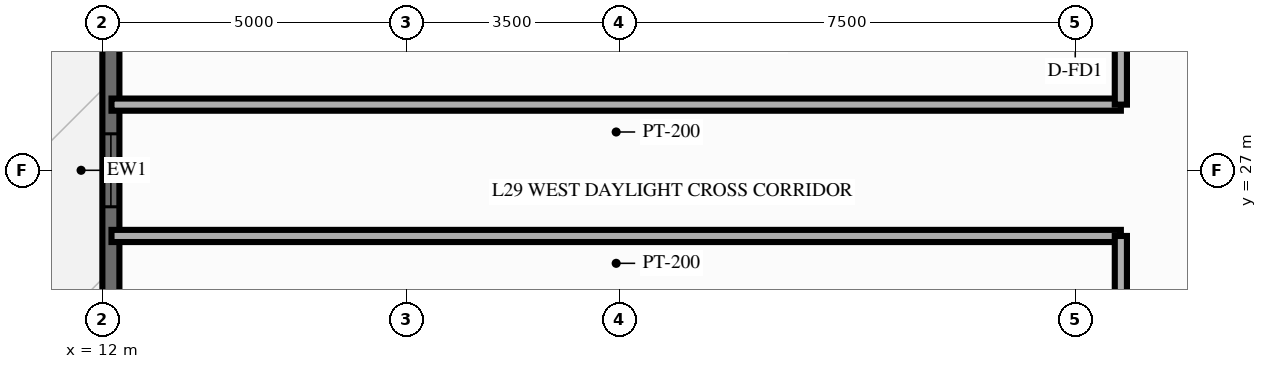
"""IFC4 building model, lengths in metres.
Left out: names, types, materials, properties, quantities, classifications, styles, units other than length and angle.
Written with IfcOpenShell. Run it as: python <this file> out.ifc"""

import sys

from ifc_helpers import new_model, si_unit, direction, frame, frame_2d, origin, place, context, subcontext, project, spatial, rectangle, extrude, source, transform, mapped, element, fill, save


model = new_model("IFC4")
c1 = context("Model", 3, precision=1e-05, world=origin(), true_north=direction((0.0, 1.0)))
c2 = subcontext(c1, "Body", "Model", "MODEL_VIEW")
j1 = project(units=[si_unit("LENGTHUNIT", "METRE"), si_unit("PLANEANGLEUNIT", "RADIAN")], contexts=[c1])
p1 = place(None, origin())
s1 = spatial("IfcSite", under=j1, at=p1, CompositionType="ELEMENT")
p2 = place(p1, origin())
s2 = spatial("IfcBuilding", under=s1, at=p2, CompositionType="ELEMENT")
p3 = place(p2, frame((0.0, 0.0, 92.85)))
s3 = spatial("IfcBuildingStorey", under=s2, at=p3, CompositionType="ELEMENT", Elevation=92.85)
p4 = place(p3, frame((12.14, 7.2, 0.0), z_axis=(0.0, 0.0, 1.0), x_axis=(0.0, 1.0, 0.0)))
e1 = element("IfcWall", 1, at=p4, inside=s3, PredefinedType="SOLIDWALL", context=c2, shape_type="SweptSolid", body=[
    extrude(rectangle(XDim=39.6, YDim=0.28, at=frame_2d((19.8, 0.0))), origin(), (0.0, 0.0, 1.0), 2.28),
])
p5 = place(p4, frame((1.374, 0.0, 0.25)))
e2 = element("IfcOpeningElement", 2, at=p5, cuts=e1, PredefinedType="OPENING", context=c2, shape_type="SweptSolid", body=[
    extrude(rectangle(XDim=1.2, YDim=1.5, at=frame_2d((0.6, 0.75))), frame((0.0, 0.152, 0.0), z_axis=(0.0, -1.0, 0.0), x_axis=(1.0, 0.0, 0.0)), (0.0, 0.0, 1.0), 0.304),
])
p6 = place(p4, frame((4.458, 0.0, 0.25)))
e3 = element("IfcOpeningElement", 3, at=p6, cuts=e1, PredefinedType="OPENING", context=c2, shape_type="SweptSolid", body=[
    extrude(rectangle(XDim=1.2, YDim=1.5, at=frame_2d((0.6, 0.75))), frame((0.0, 0.152, 0.0), z_axis=(0.0, -1.0, 0.0), x_axis=(1.0, 0.0, 0.0)), (0.0, 0.0, 1.0), 0.304),
])
p7 = place(p4, frame((7.382, 0.0, 0.25)))
e4 = element("IfcOpeningElement", 4, at=p7, cuts=e1, PredefinedType="OPENING", context=c2, shape_type="SweptSolid", body=[
    extrude(rectangle(XDim=1.2, YDim=1.5, at=frame_2d((0.6, 0.75))), frame((0.0, 0.152, 0.0), z_axis=(0.0, -1.0, 0.0), x_axis=(1.0, 0.0, 0.0)), (0.0, 0.0, 1.0), 0.304),
])
p8 = place(p4, frame((11.508, 0.0, 0.25)))
e5 = element("IfcOpeningElement", 5, at=p8, cuts=e1, PredefinedType="OPENING", context=c2, shape_type="SweptSolid", body=[
    extrude(rectangle(XDim=0.7, YDim=1.5, at=frame_2d((0.35, 0.75))), frame((0.0, 0.152, 0.0), z_axis=(0.0, -1.0, 0.0), x_axis=(1.0, 0.0, 0.0)), (0.0, 0.0, 1.0), 0.304),
])
p9 = place(p4, frame((13.409, 0.0, 0.25)))
e6 = element("IfcOpeningElement", 6, at=p9, cuts=e1, PredefinedType="OPENING", context=c2, shape_type="SweptSolid", body=[
    extrude(rectangle(XDim=1.2, YDim=1.5, at=frame_2d((0.6, 0.75))), frame((0.0, 0.152, 0.0), z_axis=(0.0, -1.0, 0.0), x_axis=(1.0, 0.0, 0.0)), (0.0, 0.0, 1.0), 0.304),
])
p10 = place(p4, frame((16.468, 0.0, 0.25)))
e7 = element("IfcOpeningElement", 7, at=p10, cuts=e1, PredefinedType="OPENING", context=c2, shape_type="SweptSolid", body=[
    extrude(rectangle(XDim=1.2, YDim=1.5, at=frame_2d((0.6, 0.75))), frame((0.0, 0.152, 0.0), z_axis=(0.0, -1.0, 0.0), x_axis=(1.0, 0.0, 0.0)), (0.0, 0.0, 1.0), 0.304),
])
p11 = place(p4, frame((19.2, 0.0, 0.25)))
e8 = element("IfcOpeningElement", 8, at=p11, cuts=e1, PredefinedType="OPENING", context=c2, shape_type="SweptSolid", body=[
    extrude(rectangle(XDim=1.2, YDim=1.5, at=frame_2d((0.6, 0.75))), frame((0.0, 0.152, 0.0), z_axis=(0.0, -1.0, 0.0), x_axis=(1.0, 0.0, 0.0)), (0.0, 0.0, 1.0), 0.304),
])
p12 = place(p4, frame((21.807, 0.0, 0.0)))
e9 = element("IfcOpeningElement", 9, at=p12, cuts=e1, PredefinedType="OPENING", context=c2, shape_type="SweptSolid", body=[
    extrude(rectangle(XDim=1.6, YDim=2.15, at=frame_2d((0.8, 1.075))), frame((0.0, 0.152, 0.0), z_axis=(0.0, -1.0, 0.0), x_axis=(1.0, 0.0, 0.0)), (0.0, 0.0, 1.0), 0.304),
])
p13 = place(p4, frame((25.159, 0.0, 0.25)))
e10 = element("IfcOpeningElement", 10, at=p13, cuts=e1, PredefinedType="OPENING", context=c2, shape_type="SweptSolid", body=[
    extrude(rectangle(XDim=1.2, YDim=1.5, at=frame_2d((0.6, 0.75))), frame((0.0, 0.152, 0.0), z_axis=(0.0, -1.0, 0.0), x_axis=(1.0, 0.0, 0.0)), (0.0, 0.0, 1.0), 0.304),
])
p14 = place(p4, frame((27.484, 0.0, 0.25)))
e11 = element("IfcOpeningElement", 11, at=p14, cuts=e1, PredefinedType="OPENING", context=c2, shape_type="SweptSolid", body=[
    extrude(rectangle(XDim=0.7, YDim=1.5, at=frame_2d((0.35, 0.75))), frame((0.0, 0.152, 0.0), z_axis=(0.0, -1.0, 0.0), x_axis=(1.0, 0.0, 0.0)), (0.0, 0.0, 1.0), 0.304),
])
p15 = place(p4, frame((31.111, 0.0, 0.25)))
e12 = element("IfcOpeningElement", 12, at=p15, cuts=e1, PredefinedType="OPENING", context=c2, shape_type="SweptSolid", body=[
    extrude(rectangle(XDim=1.2, YDim=1.5, at=frame_2d((0.6, 0.75))), frame((0.0, 0.152, 0.0), z_axis=(0.0, -1.0, 0.0), x_axis=(1.0, 0.0, 0.0)), (0.0, 0.0, 1.0), 0.304),
])
p16 = place(p4, frame((34.109, 0.0, 0.25)))
e13 = element("IfcOpeningElement", 13, at=p16, cuts=e1, PredefinedType="OPENING", context=c2, shape_type="SweptSolid", body=[
    extrude(rectangle(XDim=1.2, YDim=1.5, at=frame_2d((0.6, 0.75))), frame((0.0, 0.152, 0.0), z_axis=(0.0, -1.0, 0.0), x_axis=(1.0, 0.0, 0.0)), (0.0, 0.0, 1.0), 0.304),
])
p17 = place(p4, frame((37.101, 0.0, 0.25)))
e14 = element("IfcOpeningElement", 14, at=p17, cuts=e1, PredefinedType="OPENING", context=c2, shape_type="SweptSolid", body=[
    extrude(rectangle(XDim=1.2, YDim=1.5, at=frame_2d((0.6, 0.75))), frame((0.0, 0.152, 0.0), z_axis=(0.0, -1.0, 0.0), x_axis=(1.0, 0.0, 0.0)), (0.0, 0.0, 1.0), 0.304),
])
p18 = place(p3, frame((28.75, 25.92, 0.0), z_axis=(0.0, 0.0, 1.0), x_axis=(-1.0, 0.0, 0.0)))
e15 = element("IfcWall", 15, at=p18, inside=s3, PredefinedType="PARTITIONING", context=c2, shape_type="SweptSolid", body=[
    extrude(rectangle(XDim=16.6, YDim=0.2, at=frame_2d((8.3, 0.0))), origin(), (0.0, 0.0, 1.0), 2.79),
])
p19 = place(p3, frame((28.75, 22.616, 0.0), z_axis=(0.0, 0.0, 1.0), x_axis=(0.0, 1.0, 0.0)))
e16 = element("IfcWall", 16, at=p19, inside=s3, PredefinedType="PARTITIONING", context=c2, shape_type="SweptSolid", body=[
    extrude(rectangle(XDim=3.304, YDim=0.2, at=frame_2d((1.652, 0.0))), origin(), (0.0, 0.0, 1.0), 2.79),
])
p20 = place(p19, frame((1.152, 0.0, 0.0)))
e17 = element("IfcOpeningElement", 17, at=p20, cuts=e16, PredefinedType="OPENING", context=c2, shape_type="SweptSolid", body=[
    extrude(rectangle(XDim=1.0, YDim=2.15, at=frame_2d((0.5, 1.075))), frame((0.0, 0.112, 0.0), z_axis=(0.0, -1.0, 0.0), x_axis=(1.0, 0.0, 0.0)), (0.0, 0.0, 1.0), 0.224),
])
p21 = place(p3, frame((28.75, 28.08, 0.0), z_axis=(0.0, 0.0, 1.0), x_axis=(-1.0, 0.0, 0.0)))
e18 = element("IfcWall", 18, at=p21, inside=s3, PredefinedType="PARTITIONING", context=c2, shape_type="SweptSolid", body=[
    extrude(rectangle(XDim=16.6, YDim=0.2, at=frame_2d((8.3, 0.0))), origin(), (0.0, 0.0, 1.0), 2.79),
])
p22 = place(p3, frame((28.75, 28.08, 0.0), z_axis=(0.0, 0.0, 1.0), x_axis=(0.0, 1.0, 0.0)))
e19 = element("IfcWall", 19, at=p22, inside=s3, PredefinedType="PARTITIONING", context=c2, shape_type="SweptSolid", body=[
    extrude(rectangle(XDim=3.454, YDim=0.2, at=frame_2d((1.727, 0.0))), origin(), (0.0, 0.0, 1.0), 2.79),
])
p23 = place(p22, frame((1.227, 0.0, 0.0)))
e20 = element("IfcOpeningElement", 20, at=p23, cuts=e19, PredefinedType="OPENING", context=c2, shape_type="SweptSolid", body=[
    extrude(rectangle(XDim=1.0, YDim=2.15, at=frame_2d((0.5, 1.075))), frame((0.0, 0.112, 0.0), z_axis=(0.0, -1.0, 0.0), x_axis=(1.0, 0.0, 0.0)), (0.0, 0.0, 1.0), 0.224),
])
m1 = source(origin(), c2, "Body", "SweptSolid", [
    extrude(rectangle(XDim=1.2, YDim=1.5, at=frame_2d((0.6, 0.75))), frame((0.0, 0.03, 0.0), z_axis=(0.0, -1.0, 0.0), x_axis=(1.0, 0.0, 0.0)), (0.0, 0.0, 1.0), 0.06),
])
p24 = place(p11, origin())
e21 = element("IfcWindow", 21, at=p24, inside=s3, PartitioningType="SINGLE_PANEL", PredefinedType="WINDOW", context=c2, shape_type="MappedRepresentation", body=[
    mapped(m1, transform((0.0, 0.0, 0.0), scale=1.0)),
])
fill(e8, e21)
save(model, sys.argv[1])
